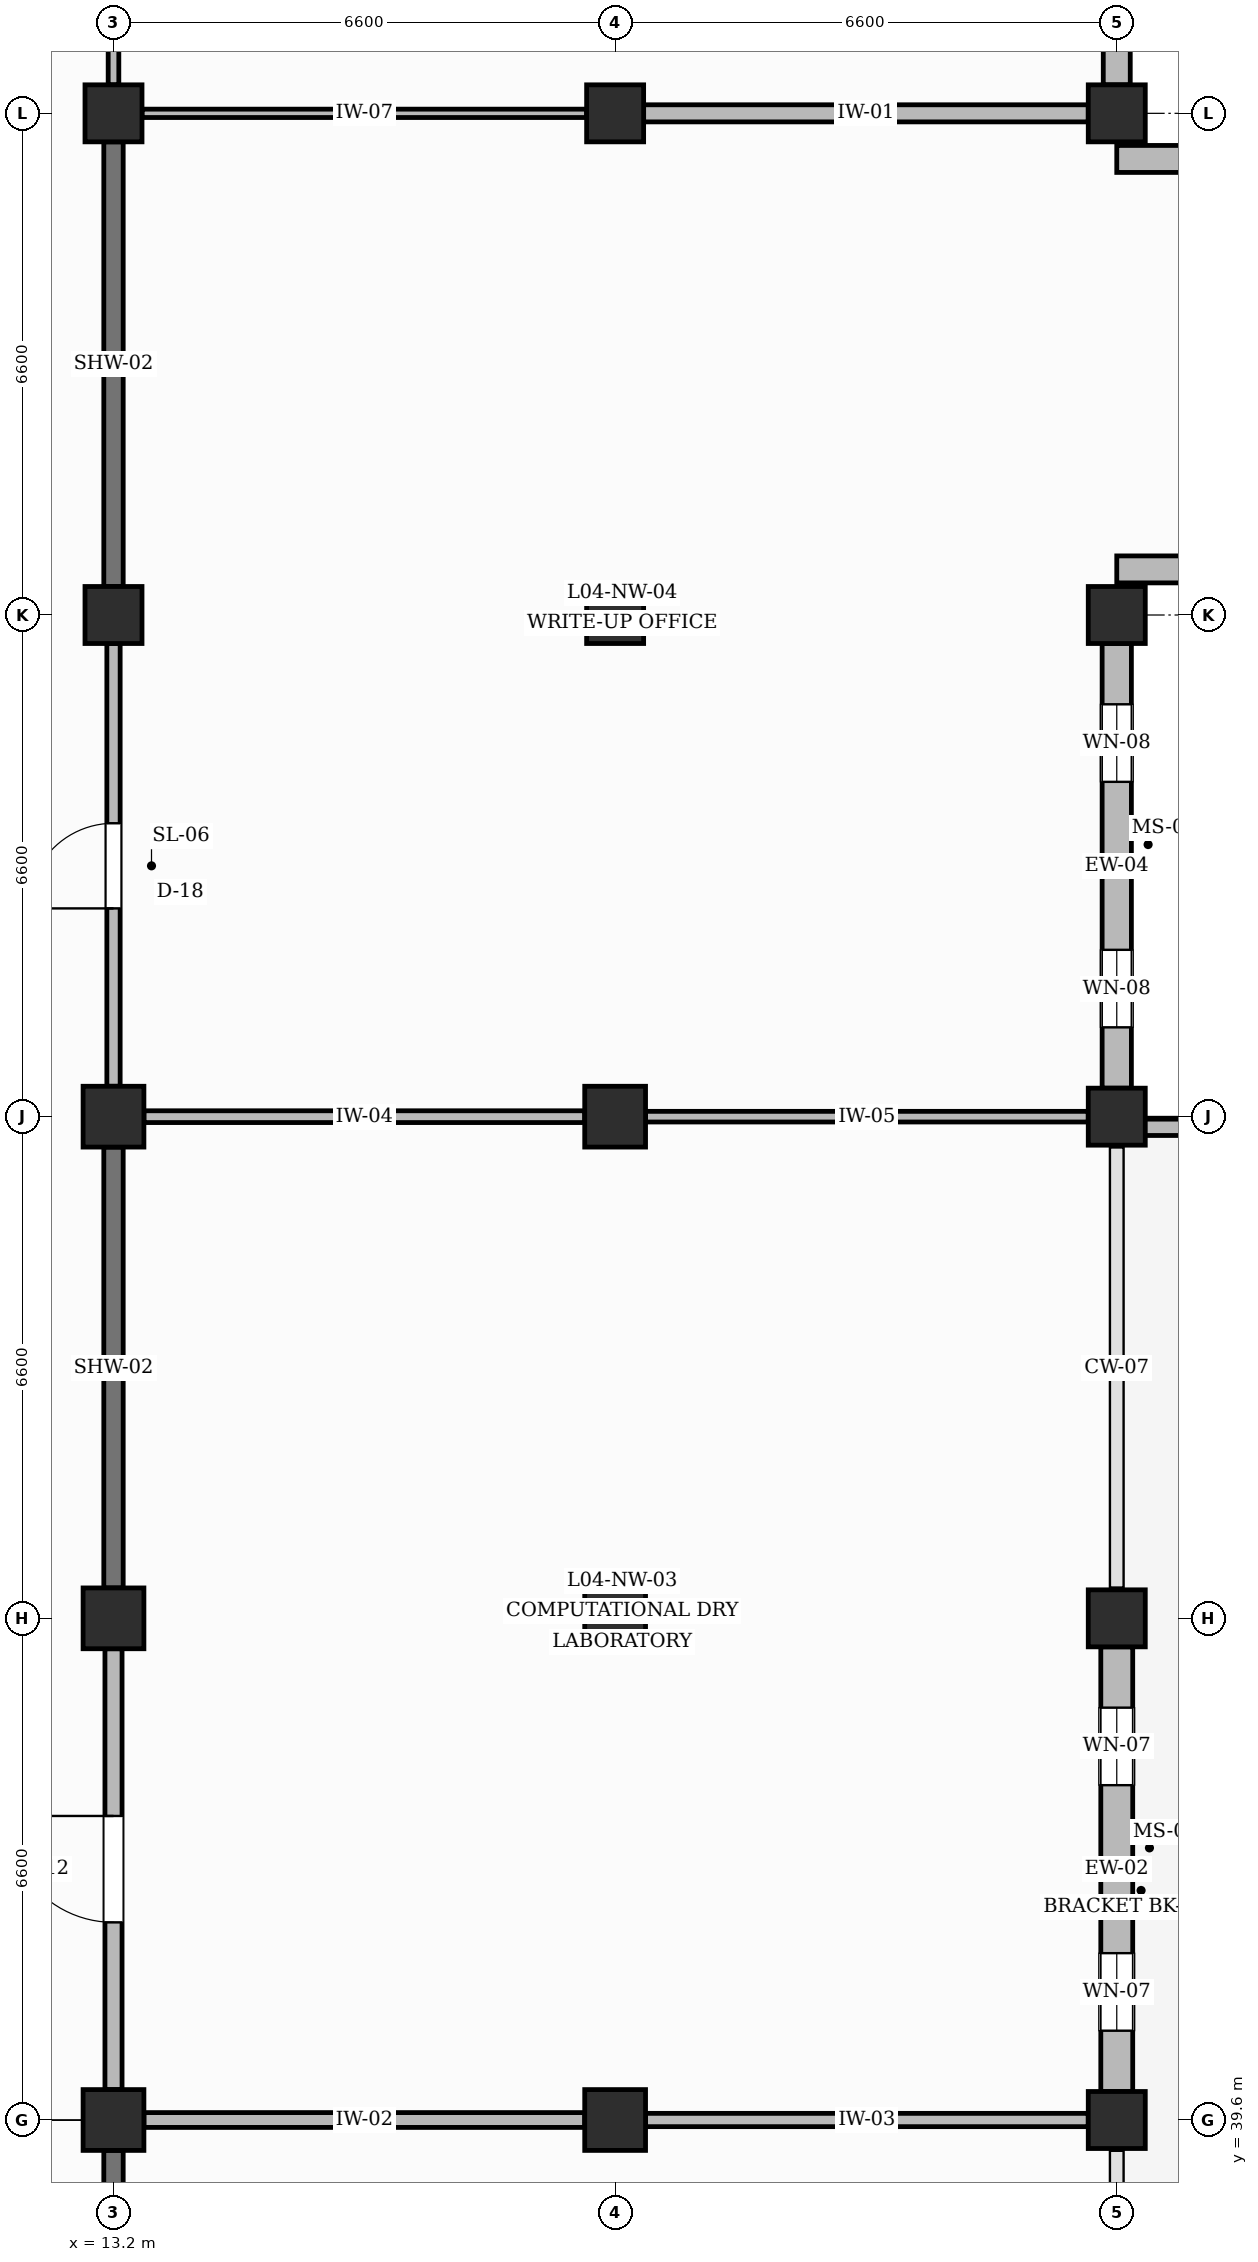
"""IFC4 building model, lengths in metres.
Left out: names, types, materials, properties, quantities, classifications, styles, units other than length and angle.
Written with IfcOpenShell. Run it as: python <this file> out.ifc"""

import sys

from ifc_helpers import new_model, si_unit, direction, frame, frame_2d, origin, origin_2d, place, context, subcontext, project, spatial, rectangle, extrude, element, fill, save


model = new_model("IFC4")
c1 = context("Model", 3, precision=1e-05, world=origin(), true_north=direction((0.0, 1.0)))
c2 = subcontext(c1, "Body", "Model", "MODEL_VIEW")
j1 = project(units=[si_unit("LENGTHUNIT", "METRE"), si_unit("PLANEANGLEUNIT", "RADIAN")], contexts=[c1])
p1 = place(None, origin())
s1 = spatial("IfcSite", under=j1, at=p1, CompositionType="ELEMENT")
p2 = place(p1, origin())
s2 = spatial("IfcBuilding", under=s1, at=p2, CompositionType="ELEMENT")
p3 = place(p2, frame((0.0, 0.0, 18.6)))
s3 = spatial("IfcBuildingStorey", under=s2, at=p3, CompositionType="ELEMENT", Elevation=18.6)
for number, where, z_axis, x_axis in (
    (1, (13.2, 39.6, 0.0), (0.0, 0.0, 1.0), (1.0, 0.0, 0.0)),
    (2, (13.2, 46.2, 0.0), (0.0, 0.0, 1.0), (1.0, 0.0, 0.0)),
    (3, (13.2, 52.8, 0.0), (0.0, 0.0, 1.0), (1.0, 0.0, 0.0)),
):
    element("IfcColumn", number, at=place(p3, frame(where, z_axis=z_axis, x_axis=x_axis)), inside=s3, PredefinedType="COLUMN", context=c2, shape_type="SweptSolid", body=[
        extrude(rectangle(XDim=0.8, YDim=0.8, at=origin_2d()), origin(), (0.0, 0.0, 1.0), 4.2),
    ])
for number, where, z_axis, x_axis in (
    (4, (13.2, 59.4, 0.0), (0.0, 0.0, 1.0), (1.0, 0.0, 0.0)),
    (5, (13.2, 66.0, 0.0), (0.0, 0.0, 1.0), (1.0, 0.0, 0.0)),
):
    element("IfcColumn", number, at=place(p3, frame(where, z_axis=z_axis, x_axis=x_axis)), inside=s3, PredefinedType="COLUMN", context=c2, shape_type="SweptSolid", body=[
        extrude(rectangle(XDim=0.75, YDim=0.75, at=origin_2d()), origin(), (0.0, 0.0, 1.0), 4.2),
    ])
for number, where, z_axis, x_axis in (
    (6, (19.8, 39.6, 0.0), (0.0, 0.0, 1.0), (1.0, 0.0, 0.0)),
    (7, (19.8, 46.2, 0.0), (0.0, 0.0, 1.0), (1.0, 0.0, 0.0)),
    (8, (19.8, 52.8, 0.0), (0.0, 0.0, 1.0), (1.0, 0.0, 0.0)),
):
    element("IfcColumn", number, at=place(p3, frame(where, z_axis=z_axis, x_axis=x_axis)), inside=s3, PredefinedType="COLUMN", context=c2, shape_type="SweptSolid", body=[
        extrude(rectangle(XDim=0.8, YDim=0.8, at=origin_2d()), origin(), (0.0, 0.0, 1.0), 4.2),
    ])
for number, where, z_axis, x_axis in (
    (9, (19.8, 59.4, 0.0), (0.0, 0.0, 1.0), (1.0, 0.0, 0.0)),
    (10, (19.8, 66.0, 0.0), (0.0, 0.0, 1.0), (1.0, 0.0, 0.0)),
    (11, (26.4, 39.6, 0.0), (0.0, 0.0, 1.0), (1.0, 0.0, 0.0)),
    (12, (26.4, 46.2, 0.0), (0.0, 0.0, 1.0), (1.0, 0.0, 0.0)),
    (13, (26.4, 52.8, 0.0), (0.0, 0.0, 1.0), (1.0, 0.0, 0.0)),
    (14, (26.4, 59.4, 0.0), (0.0, 0.0, 1.0), (1.0, 0.0, 0.0)),
    (15, (26.4, 66.0, 0.0), (0.0, 0.0, 1.0), (1.0, 0.0, 0.0)),
):
    element("IfcColumn", number, at=place(p3, frame(where, z_axis=z_axis, x_axis=x_axis)), inside=s3, PredefinedType="COLUMN", context=c2, shape_type="SweptSolid", body=[
        extrude(rectangle(XDim=0.75, YDim=0.75, at=origin_2d()), origin(), (0.0, 0.0, 1.0), 4.2),
    ])
p4 = place(p3, frame((26.4, 39.975, 0.0), z_axis=(0.0, 0.0, 1.0), x_axis=(0.0, 1.0, 0.0)))
e16 = element("IfcWall", 16, at=p4, inside=s3, PredefinedType="SOLIDWALL", context=c2, shape_type="SweptSolid", body=[
    extrude(rectangle(XDim=5.85, YDim=0.42, at=frame_2d((2.925, 0.0))), origin(), (0.0, 0.0, 1.0), 3.26),
])
p5 = place(p4, frame((0.8, 0.0, 0.95)))
e17 = element("IfcOpeningElement", 17, at=p5, cuts=e16, PredefinedType="OPENING", context=c2, shape_type="SweptSolid", body=[
    extrude(rectangle(XDim=1.02, YDim=1.74, at=frame_2d((0.51, 0.87))), frame((0.0, 0.22, 0.0), z_axis=(0.0, -1.0, 0.0), x_axis=(1.0, 0.0, 0.0)), (0.0, 0.0, 1.0), 0.44),
])
p6 = place(p4, frame((4.03, 0.0, 0.95)))
e18 = element("IfcOpeningElement", 18, at=p6, cuts=e16, PredefinedType="OPENING", context=c2, shape_type="SweptSolid", body=[
    extrude(rectangle(XDim=1.02, YDim=1.74, at=frame_2d((0.51, 0.87))), frame((0.0, 0.22, 0.0), z_axis=(0.0, -1.0, 0.0), x_axis=(1.0, 0.0, 0.0)), (0.0, 0.0, 1.0), 0.44),
])
p7 = place(p3, frame((26.4, 53.175, 0.0), z_axis=(0.0, 0.0, 1.0), x_axis=(0.0, 1.0, 0.0)))
e19 = element("IfcWall", 19, at=p7, inside=s3, PredefinedType="SOLIDWALL", context=c2, shape_type="SweptSolid", body=[
    extrude(rectangle(XDim=5.85, YDim=0.385, at=frame_2d((2.925, 0.0))), origin(), (0.0, 0.0, 1.0), 3.26),
])
p8 = place(p7, frame((0.8, 0.0, 0.95)))
e20 = element("IfcOpeningElement", 20, at=p8, cuts=e19, PredefinedType="OPENING", context=c2, shape_type="SweptSolid", body=[
    extrude(rectangle(XDim=1.02, YDim=1.96, at=frame_2d((0.51, 0.98))), frame((0.0, 0.202, 0.0), z_axis=(0.0, -1.0, 0.0), x_axis=(1.0, 0.0, 0.0)), (0.0, 0.0, 1.0), 0.405),
])
p9 = place(p7, frame((4.03, 0.0, 0.95)))
e21 = element("IfcOpeningElement", 21, at=p9, cuts=e19, PredefinedType="OPENING", context=c2, shape_type="SweptSolid", body=[
    extrude(rectangle(XDim=1.02, YDim=1.96, at=frame_2d((0.51, 0.98))), frame((0.0, 0.202, 0.0), z_axis=(0.0, -1.0, 0.0), x_axis=(1.0, 0.0, 0.0)), (0.0, 0.0, 1.0), 0.405),
])
for number, where, z_axis, x_axis in (
    (22, (26.4, 60.0, 0.0), (0.0, 0.0, 1.0), (1.0, 0.0, 0.0)),
    (23, (26.4, 65.4, 0.0), (0.0, 0.0, 1.0), (1.0, 0.0, 0.0)),
):
    element("IfcWall", number, at=place(p3, frame(where, z_axis=z_axis, x_axis=x_axis)), inside=s3, PredefinedType="SOLIDWALL", context=c2, shape_type="SweptSolid", body=[
        extrude(rectangle(XDim=2.0, YDim=0.355, at=frame_2d((1.0, 0.0))), origin(), (0.0, 0.0, 1.0), 3.26),
    ])
p10 = place(p3, frame((26.4, 66.375, 0.0), z_axis=(0.0, 0.0, 1.0), x_axis=(0.0, 1.0, 0.0)))
e24 = element("IfcWall", 24, at=p10, inside=s3, PredefinedType="SOLIDWALL", context=c2, shape_type="SweptSolid", body=[
    extrude(rectangle(XDim=5.85, YDim=0.355, at=frame_2d((2.925, 0.0))), origin(), (0.0, 0.0, 1.0), 3.26),
])
p11 = place(p10, frame((0.8, 0.0, 0.95)))
e25 = element("IfcOpeningElement", 25, at=p11, cuts=e24, PredefinedType="OPENING", context=c2, shape_type="SweptSolid", body=[
    extrude(rectangle(XDim=1.18, YDim=1.3, at=frame_2d((0.59, 0.65))), frame((0.0, 0.188, 0.0), z_axis=(0.0, -1.0, 0.0), x_axis=(1.0, 0.0, 0.0)), (0.0, 0.0, 1.0), 0.375),
])
p12 = place(p10, frame((3.87, 0.0, 0.95)))
e26 = element("IfcOpeningElement", 26, at=p12, cuts=e24, PredefinedType="OPENING", context=c2, shape_type="SweptSolid", body=[
    extrude(rectangle(XDim=1.18, YDim=1.3, at=frame_2d((0.59, 0.65))), frame((0.0, 0.188, 0.0), z_axis=(0.0, -1.0, 0.0), x_axis=(1.0, 0.0, 0.0)), (0.0, 0.0, 1.0), 0.375),
])
p13 = place(p3, frame((26.54, 52.66, 0.0), z_axis=(0.0, 0.0, 1.0), x_axis=(1.0, 0.0, 0.0)))
e27 = element("IfcWall", 27, at=p13, inside=s3, PredefinedType="PARAPET", context=c2, shape_type="SweptSolid", body=[
    extrude(rectangle(XDim=6.32, YDim=0.215, at=frame_2d((3.16, 0.0))), origin(), (0.0, 0.0, 1.0), 1.15),
])
p14 = place(p3, frame((13.2, 33.4, 0.0), z_axis=(0.0, 0.0, 1.0), x_axis=(0.0, 1.0, 0.0)))
e28 = element("IfcWall", 28, at=p14, inside=s3, PredefinedType="SHEAR", context=c2, shape_type="SweptSolid", body=[
    extrude(rectangle(XDim=5.8, YDim=0.255, at=frame_2d((2.9, 0.0))), origin(), (0.0, 0.0, 1.0), 3.16),
])
p15 = place(p3, frame((13.2, 40.0, 0.0), z_axis=(0.0, 0.0, 1.0), x_axis=(0.0, 1.0, 0.0)))
e29 = element("IfcWall", 29, at=p15, inside=s3, PredefinedType="PARTITIONING", context=c2, shape_type="SweptSolid", body=[
    extrude(rectangle(XDim=5.8, YDim=0.225, at=frame_2d((2.9, 0.0))), origin(), (0.0, 0.0, 1.0), 3.16),
])
p16 = place(p15, frame((2.2, 0.0, 0.0)))
e30 = element("IfcOpeningElement", 30, at=p16, cuts=e29, PredefinedType="OPENING", context=c2, shape_type="SweptSolid", body=[
    extrude(rectangle(XDim=1.4, YDim=2.25, at=frame_2d((0.7, 1.125))), frame((0.0, 0.123, 0.0), z_axis=(0.0, -1.0, 0.0), x_axis=(1.0, 0.0, 0.0)), (0.0, 0.0, 1.0), 0.245),
])
p17 = place(p3, frame((13.2, 46.6, 0.0), z_axis=(0.0, 0.0, 1.0), x_axis=(0.0, 1.0, 0.0)))
e31 = element("IfcWall", 31, at=p17, inside=s3, PredefinedType="SHEAR", context=c2, shape_type="SweptSolid", body=[
    extrude(rectangle(XDim=5.8, YDim=0.255, at=frame_2d((2.9, 0.0))), origin(), (0.0, 0.0, 1.0), 3.16),
])
p18 = place(p3, frame((13.2, 53.2, 0.0), z_axis=(0.0, 0.0, 1.0), x_axis=(0.0, 1.0, 0.0)))
e32 = element("IfcWall", 32, at=p18, inside=s3, PredefinedType="PARTITIONING", context=c2, shape_type="SweptSolid", body=[
    extrude(rectangle(XDim=5.825, YDim=0.175, at=frame_2d((2.913, 0.0))), origin(), (0.0, 0.0, 1.0), 3.16),
])
p19 = place(p18, frame((2.34, 0.0, 0.0)))
e33 = element("IfcOpeningElement", 33, at=p19, cuts=e32, PredefinedType="OPENING", context=c2, shape_type="SweptSolid", body=[
    extrude(rectangle(XDim=1.12, YDim=2.2, at=frame_2d((0.56, 1.1))), frame((0.0, 0.097, 0.0), z_axis=(0.0, -1.0, 0.0), x_axis=(1.0, 0.0, 0.0)), (0.0, 0.0, 1.0), 0.195),
])
p20 = place(p3, frame((13.2, 59.775, 0.0), z_axis=(0.0, 0.0, 1.0), x_axis=(0.0, 1.0, 0.0)))
e34 = element("IfcWall", 34, at=p20, inside=s3, PredefinedType="SHEAR", context=c2, shape_type="SweptSolid", body=[
    extrude(rectangle(XDim=5.85, YDim=0.255, at=frame_2d((2.925, 0.0))), origin(), (0.0, 0.0, 1.0), 3.16),
])
p21 = place(p3, frame((13.2, 66.375, 0.0), z_axis=(0.0, 0.0, 1.0), x_axis=(0.0, 1.0, 0.0)))
e35 = element("IfcWall", 35, at=p21, inside=s3, PredefinedType="PARTITIONING", context=c2, shape_type="SweptSolid", body=[
    extrude(rectangle(XDim=5.85, YDim=0.14, at=frame_2d((2.925, 0.0))), origin(), (0.0, 0.0, 1.0), 3.16),
])
p22 = place(p21, frame((2.275, 0.0, 0.0)))
e36 = element("IfcOpeningElement", 36, at=p22, cuts=e35, PredefinedType="OPENING", context=c2, shape_type="SweptSolid", body=[
    extrude(rectangle(XDim=1.3, YDim=2.3, at=frame_2d((0.65, 1.15))), frame((0.0, 0.08, 0.0), z_axis=(0.0, -1.0, 0.0), x_axis=(1.0, 0.0, 0.0)), (0.0, 0.0, 1.0), 0.16),
])
p23 = place(p3, frame((13.6, 39.6, 0.0), z_axis=(0.0, 0.0, 1.0), x_axis=(1.0, 0.0, 0.0)))
e37 = element("IfcWall", 37, at=p23, inside=s3, PredefinedType="PARTITIONING", context=c2, shape_type="SweptSolid", body=[
    extrude(rectangle(XDim=5.8, YDim=0.195, at=frame_2d((2.9, 0.0))), origin(), (0.0, 0.0, 1.0), 3.16),
])
p24 = place(p3, frame((13.6, 52.8, 0.0), z_axis=(0.0, 0.0, 1.0), x_axis=(1.0, 0.0, 0.0)))
e38 = element("IfcWall", 38, at=p24, inside=s3, PredefinedType="PARTITIONING", context=c2, shape_type="SweptSolid", body=[
    extrude(rectangle(XDim=5.8, YDim=0.155, at=frame_2d((2.9, 0.0))), origin(), (0.0, 0.0, 1.0), 3.16),
])
p25 = place(p3, frame((13.575, 66.0, 0.0), z_axis=(0.0, 0.0, 1.0), x_axis=(1.0, 0.0, 0.0)))
e39 = element("IfcWall", 39, at=p25, inside=s3, PredefinedType="PARTITIONING", context=c2, shape_type="SweptSolid", body=[
    extrude(rectangle(XDim=5.85, YDim=0.11, at=frame_2d((2.925, 0.0))), origin(), (0.0, 0.0, 1.0), 3.16),
])
p26 = place(p3, frame((20.2, 39.6, 0.0), z_axis=(0.0, 0.0, 1.0), x_axis=(1.0, 0.0, 0.0)))
e40 = element("IfcWall", 40, at=p26, inside=s3, PredefinedType="PARTITIONING", context=c2, shape_type="SweptSolid", body=[
    extrude(rectangle(XDim=5.825, YDim=0.175, at=frame_2d((2.913, 0.0))), origin(), (0.0, 0.0, 1.0), 3.16),
])
p27 = place(p3, frame((20.2, 52.8, 0.0), z_axis=(0.0, 0.0, 1.0), x_axis=(1.0, 0.0, 0.0)))
e41 = element("IfcWall", 41, at=p27, inside=s3, PredefinedType="PARTITIONING", context=c2, shape_type="SweptSolid", body=[
    extrude(rectangle(XDim=5.825, YDim=0.14, at=frame_2d((2.913, 0.0))), origin(), (0.0, 0.0, 1.0), 3.16),
])
p28 = place(p3, frame((20.175, 66.0, 0.0), z_axis=(0.0, 0.0, 1.0), x_axis=(1.0, 0.0, 0.0)))
e42 = element("IfcWall", 42, at=p28, inside=s3, PredefinedType="PARTITIONING", context=c2, shape_type="SweptSolid", body=[
    extrude(rectangle(XDim=5.85, YDim=0.225, at=frame_2d((2.925, 0.0))), origin(), (0.0, 0.0, 1.0), 3.41),
])
p29 = place(p5, origin())
e43 = element("IfcWindow", 43, at=p29, inside=s3, PartitioningType="SINGLE_PANEL", PredefinedType="WINDOW", context=c2, shape_type="SweptSolid", body=[
    extrude(rectangle(XDim=1.02, YDim=1.74, at=frame_2d((0.51, 0.87))), frame((0.0, 0.03, 0.0), z_axis=(0.0, -1.0, 0.0), x_axis=(1.0, 0.0, 0.0)), (0.0, 0.0, 1.0), 0.06),
])
fill(e17, e43)
p30 = place(p6, origin())
e44 = element("IfcWindow", 44, at=p30, inside=s3, PartitioningType="SINGLE_PANEL", PredefinedType="WINDOW", context=c2, shape_type="SweptSolid", body=[
    extrude(rectangle(XDim=1.02, YDim=1.74, at=frame_2d((0.51, 0.87))), frame((0.0, 0.03, 0.0), z_axis=(0.0, -1.0, 0.0), x_axis=(1.0, 0.0, 0.0)), (0.0, 0.0, 1.0), 0.06),
])
fill(e18, e44)
p31 = place(p8, origin())
e45 = element("IfcWindow", 45, at=p31, inside=s3, PartitioningType="SINGLE_PANEL", PredefinedType="WINDOW", context=c2, shape_type="SweptSolid", body=[
    extrude(rectangle(XDim=1.02, YDim=1.96, at=frame_2d((0.51, 0.98))), frame((0.0, 0.03, 0.0), z_axis=(0.0, -1.0, 0.0), x_axis=(1.0, 0.0, 0.0)), (0.0, 0.0, 1.0), 0.06),
])
fill(e20, e45)
p32 = place(p9, origin())
e46 = element("IfcWindow", 46, at=p32, inside=s3, PartitioningType="SINGLE_PANEL", PredefinedType="WINDOW", context=c2, shape_type="SweptSolid", body=[
    extrude(rectangle(XDim=1.02, YDim=1.96, at=frame_2d((0.51, 0.98))), frame((0.0, 0.03, 0.0), z_axis=(0.0, -1.0, 0.0), x_axis=(1.0, 0.0, 0.0)), (0.0, 0.0, 1.0), 0.06),
])
fill(e21, e46)
p33 = place(p16, origin())
e47 = element("IfcDoor", 47, at=p33, inside=s3, OperationType="SINGLE_SWING_RIGHT", PredefinedType="DOOR", context=c2, shape_type="SweptSolid", body=[
    extrude(rectangle(XDim=1.4, YDim=2.25, at=frame_2d((0.7, 1.125))), frame((0.0, 0.025, 0.0), z_axis=(0.0, -1.0, 0.0), x_axis=(1.0, 0.0, 0.0)), (0.0, 0.0, 1.0), 0.05),
])
fill(e30, e47)
p34 = place(p19, origin())
e48 = element("IfcDoor", 48, at=p34, inside=s3, OperationType="SINGLE_SWING_LEFT", PredefinedType="DOOR", context=c2, shape_type="SweptSolid", body=[
    extrude(rectangle(XDim=1.12, YDim=2.2, at=frame_2d((0.56, 1.1))), frame((0.0, 0.025, 0.0), z_axis=(0.0, -1.0, 0.0), x_axis=(1.0, 0.0, 0.0)), (0.0, 0.0, 1.0), 0.05),
])
fill(e33, e48)
save(model, sys.argv[1])
